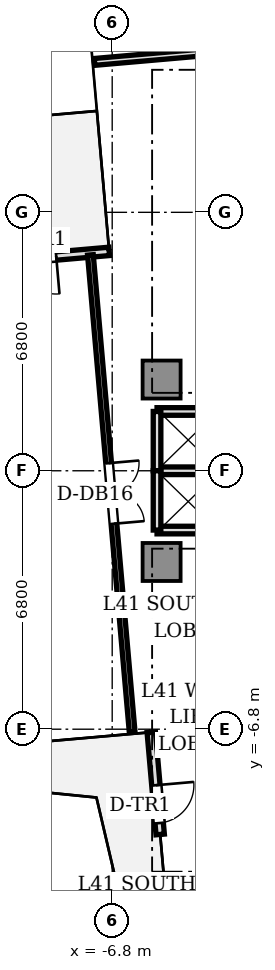
"""IFC4 building model, lengths in metres.
Left out: names, types, materials, properties, quantities, classifications, styles, units other than length and angle.
Written with IfcOpenShell. Run it as: python <this file> out.ifc"""

import sys

from ifc_helpers import new_model, si_unit, direction, frame, frame_2d, origin, origin_2d, place, context, subcontext, project, spatial, rectangle, extrude, source, transform, mapped, element, fill, save


model = new_model("IFC4")
c1 = context("Model", 3, precision=1e-05, world=origin(), true_north=direction((0.0, 1.0)))
c2 = subcontext(c1, "Body", "Model", "MODEL_VIEW")
j1 = project(units=[si_unit("LENGTHUNIT", "METRE"), si_unit("PLANEANGLEUNIT", "RADIAN")], contexts=[c1])
p1 = place(None, origin())
s1 = spatial("IfcSite", under=j1, at=p1, CompositionType="ELEMENT")
p2 = place(p1, origin())
s2 = spatial("IfcBuilding", under=s1, at=p2, CompositionType="ELEMENT")
p3 = place(p2, frame((0.0, 0.0, 150.6)))
s3 = spatial("IfcBuildingStorey", under=s2, at=p3, CompositionType="ELEMENT", Elevation=150.6)
m1 = source(origin(), c2, "Body", "SweptSolid", [
    extrude(rectangle(XDim=1.0, YDim=1.0, at=origin_2d()), origin(), (0.0, 0.0, 1.0), 3.11),
])
for number, where, z_axis, x_axis in (
    (1, (-5.5, 2.4, 0.0), (0.0, 0.0, 1.0), (1.0, 0.0, 0.0)),
    (2, (-5.5, -2.4, 0.0), (0.0, 0.0, 1.0), (1.0, 0.0, 0.0)),
):
    element("IfcColumn", number, at=place(p3, frame(where, z_axis=z_axis, x_axis=x_axis)), inside=s3, PredefinedType="COLUMN", context=c2, shape_type="MappedRepresentation", body=[
        mapped(m1, transform((0.0, 0.0, 0.0), scale=1.0)),
    ])
p4 = place(p3, frame((-6.879, 5.772, 0.0), z_axis=(0.0, 0.0, 1.0), x_axis=(-0.996193619346, -0.087168071984, 0.0)))
e3 = element("IfcWall", 3, at=p4, inside=s3, PredefinedType="STANDARD", context=c2, shape_type="SweptSolid", body=[
    extrude(rectangle(XDim=2.7, YDim=0.22, at=frame_2d((1.35, 0.0))), origin(), (0.0, 0.0, 1.0), 3.11),
])
p5 = place(p4, frame((1.4, 0.0, 0.0)))
e4 = element("IfcOpeningElement", 4, at=p5, cuts=e3, PredefinedType="OPENING", context=c2, shape_type="SweptSolid", body=[
    extrude(rectangle(XDim=1.0, YDim=2.2, at=frame_2d((0.5, 1.1))), frame((0.0, 0.12, 0.0), z_axis=(0.0, -1.0, 0.0), x_axis=(1.0, 0.0, 0.0)), (0.0, 0.0, 1.0), 0.24),
])
p6 = place(p3, frame((-5.772, -6.879, 0.0), z_axis=(0.0, 0.0, 1.0), x_axis=(0.087168071984, -0.996193619346, 0.0)))
e5 = element("IfcWall", 5, at=p6, inside=s3, PredefinedType="STANDARD", context=c2, shape_type="SweptSolid", body=[
    extrude(rectangle(XDim=2.7, YDim=0.22, at=frame_2d((1.35, 0.0))), origin(), (0.0, 0.0, 1.0), 3.11),
])
p7 = place(p6, frame((1.4, 0.0, 0.0)))
e6 = element("IfcOpeningElement", 6, at=p7, cuts=e5, PredefinedType="OPENING", context=c2, shape_type="SweptSolid", body=[
    extrude(rectangle(XDim=1.0, YDim=2.2, at=frame_2d((0.5, 1.1))), frame((0.0, 0.12, 0.0), z_axis=(0.0, -1.0, 0.0), x_axis=(1.0, 0.0, 0.0)), (0.0, 0.0, 1.0), 0.24),
])
for number, where, z_axis, x_axis in (
    (7, (-5.62, 1.56, 0.0), (0.0, 0.0, 1.0), (1.0, 0.0, 0.0)),
    (8, (-5.62, -1.56, 0.0), (0.0, 0.0, 1.0), (1.0, 0.0, 0.0)),
    (9, (-5.62, 0.0, 0.0), (0.0, 0.0, 1.0), (1.0, 0.0, 0.0)),
):
    element("IfcWall", number, at=place(p3, frame(where, z_axis=z_axis, x_axis=x_axis)), inside=s3, PredefinedType="SOLIDWALL", context=c2, shape_type="SweptSolid", body=[
        extrude(rectangle(XDim=1.64, YDim=0.2, at=frame_2d((0.82, 0.0))), origin(), (0.0, 0.0, 1.0), 2.66),
    ])
for number, where, z_axis, x_axis in (
    (10, (-5.62, 0.0, 0.0), (0.0, 0.0, 1.0), (0.0, 1.0, 0.0)),
    (11, (-5.62, -1.56, 0.0), (0.0, 0.0, 1.0), (0.0, 1.0, 0.0)),
):
    element("IfcWall", number, at=place(p3, frame(where, z_axis=z_axis, x_axis=x_axis)), inside=s3, PredefinedType="SOLIDWALL", context=c2, shape_type="SweptSolid", body=[
        extrude(rectangle(XDim=1.56, YDim=0.2, at=frame_2d((0.78, 0.0))), origin(), (0.0, 0.0, 1.0), 2.66),
    ])
p8 = place(p3, frame((3.095, 11.664, 0.0), z_axis=(0.0, 0.0, 1.0), x_axis=(-0.996196061386, -0.087140158824, 0.0)))
e12 = element("IfcWall", 12, at=p8, inside=s3, PredefinedType="PARTITIONING", context=c2, shape_type="SweptSolid", body=[
    extrude(rectangle(XDim=10.4, YDim=0.18, at=frame_2d((5.2, 0.0))), origin(), (0.0, 0.0, 1.0), 2.66),
])
p9 = place(p3, frame((-7.373, 5.679, 0.0), z_axis=(0.0, 0.0, 1.0), x_axis=(0.087154691724, -0.996194790044, 0.0)))
e13 = element("IfcWall", 13, at=p9, inside=s3, PredefinedType="PARTITIONING", context=c2, shape_type="SweptSolid", body=[
    extrude(rectangle(XDim=12.6, YDim=0.15, at=frame_2d((6.3, 0.0))), origin(), (0.0, 0.0, 1.0), 2.66),
])
p10 = place(p9, frame((5.5, 0.0, 0.0)))
e14 = element("IfcOpeningElement", 14, at=p10, cuts=e13, PredefinedType="OPENING", context=c2, shape_type="SweptSolid", body=[
    extrude(rectangle(XDim=1.6, YDim=2.25, at=frame_2d((0.8, 1.125))), frame((0.0, 0.085, 0.0), z_axis=(0.0, -1.0, 0.0), x_axis=(1.0, 0.0, 0.0)), (0.0, 0.0, 1.0), 0.17),
])
m2 = source(origin(), c2, "Body", "SweptSolid", [
    extrude(rectangle(XDim=1.0, YDim=0.05, at=origin_2d()), origin(), (0.0, 0.0, 1.0), 2.2),
])
p11 = place(p5, frame((0.5, 0.0, 0.0)))
e15 = element("IfcDoor", 15, at=p11, inside=s3, OperationType="SINGLE_SWING_LEFT", PredefinedType="DOOR", context=c2, shape_type="MappedRepresentation", body=[
    mapped(m2, transform((0.0, 0.0, 0.0), scale=1.0)),
])
fill(e4, e15)
p12 = place(p7, frame((0.5, 0.0, 0.0)))
e16 = element("IfcDoor", 16, at=p12, inside=s3, OperationType="SINGLE_SWING_LEFT", PredefinedType="DOOR", context=c2, shape_type="MappedRepresentation", body=[
    mapped(m2, transform((0.0, 0.0, 0.0), scale=1.0)),
])
fill(e6, e16)
m3 = source(origin(), c2, "Body", "SweptSolid", [
    extrude(rectangle(XDim=1.6, YDim=0.05, at=origin_2d()), origin(), (0.0, 0.0, 1.0), 2.25),
])
p13 = place(p10, frame((0.8, 0.0, 0.0)))
e17 = element("IfcDoor", 17, at=p13, inside=s3, OperationType="DOUBLE_DOOR_SINGLE_SWING", PredefinedType="DOOR", context=c2, shape_type="MappedRepresentation", body=[
    mapped(m3, transform((0.0, 0.0, 0.0), scale=1.0)),
])
fill(e14, e17)
save(model, sys.argv[1])
